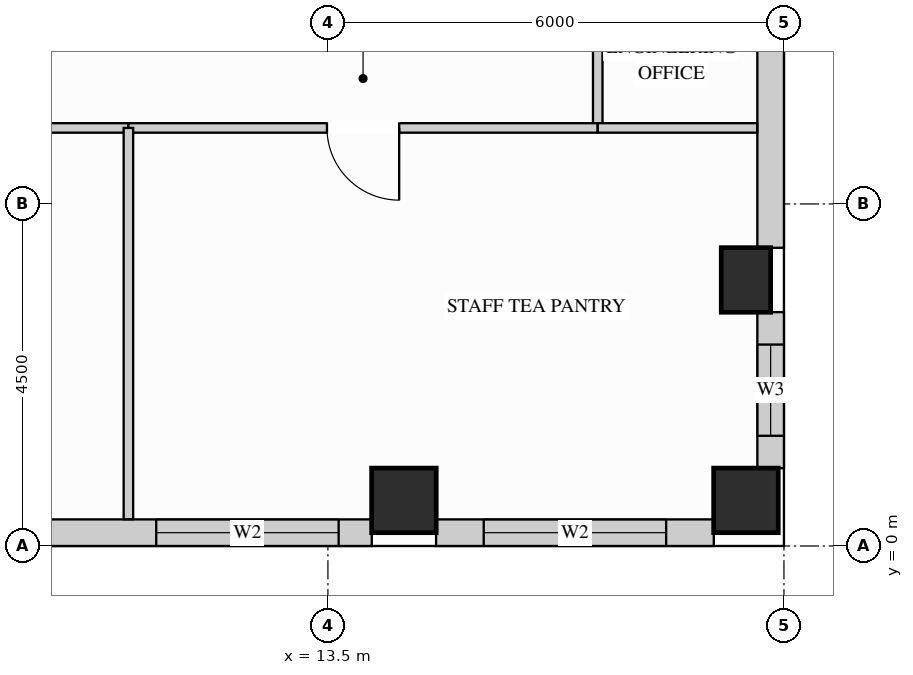
"""IFC4 building model, lengths in metres.
Left out: names, types, materials, properties, quantities, classifications, styles, units other than length and angle.
Written with IfcOpenShell. Run it as: python <this file> out.ifc"""

import sys

from ifc_helpers import new_model, si_unit, direction, frame, frame_2d, origin, origin_2d, place, context, subcontext, project, spatial, rectangle, extrude, source, transform, mapped, element, fill, save


model = new_model("IFC4")
c1 = context("Model", 3, precision=1e-05, world=origin(), true_north=direction((0.0, 1.0)))
c2 = subcontext(c1, "Body", "Model", "MODEL_VIEW")
j1 = project(units=[si_unit("LENGTHUNIT", "METRE"), si_unit("PLANEANGLEUNIT", "RADIAN")], contexts=[c1])
p1 = place(None, origin())
s1 = spatial("IfcSite", under=j1, at=p1, CompositionType="ELEMENT")
p2 = place(p1, origin())
s2 = spatial("IfcBuilding", under=s1, at=p2, CompositionType="ELEMENT")
p3 = place(p2, frame((0.0, 0.0, 237.6)))
s3 = spatial("IfcBuildingStorey", under=s2, at=p3, CompositionType="ELEMENT", Elevation=237.6)
m1 = source(origin(), c2, "Body", "SweptSolid", [
    extrude(rectangle(XDim=0.65, YDim=0.85, at=origin_2d()), origin(), (0.0, 0.0, 1.0), 3.4),
])
p4 = place(p3, frame((19.0, 3.5, 0.0), z_axis=(0.0, 0.0, 1.0), x_axis=(1.0, 0.0, 0.0)))
e1 = element("IfcColumn", 1, at=p4, inside=s3, PredefinedType="COLUMN", context=c2, shape_type="MappedRepresentation", body=[
    mapped(m1, transform((0.0, 0.0, 0.0), x_axis=(1.0, 0.0, 0.0), y_axis=(0.0, 1.0, 0.0), z_axis=(0.0, 0.0, 1.0))),
])
m2 = source(origin(), c2, "Body", "SweptSolid", [
    extrude(rectangle(XDim=0.85, YDim=0.85, at=origin_2d()), origin(), (0.0, 0.0, 1.0), 3.4),
])
for number, where, z_axis, x_axis in (
    (2, (14.5, 0.6, 0.0), (0.0, 0.0, 1.0), (1.0, 0.0, 0.0)),
    (3, (19.0, 0.6, 0.0), (0.0, 0.0, 1.0), (1.0, 0.0, 0.0)),
):
    element("IfcColumn", number, at=place(p3, frame(where, z_axis=z_axis, x_axis=x_axis)), inside=s3, PredefinedType="COLUMN", context=c2, shape_type="MappedRepresentation", body=[
        mapped(m2, transform((0.0, 0.0, 0.0), x_axis=(1.0, 0.0, 0.0), y_axis=(0.0, 1.0, 0.0), z_axis=(0.0, 0.0, 1.0))),
    ])
p5 = place(p3, frame((9.423, 0.175, 0.0), z_axis=(0.0, 0.0, 1.0), x_axis=(1.0, 0.0, 0.0)))
e4 = element("IfcWall", 4, at=p5, inside=s3, PredefinedType="SOLIDWALL", context=c2, shape_type="SweptSolid", body=[
    extrude(rectangle(XDim=4.654, YDim=0.35, at=frame_2d((2.327, 0.0))), origin(), (0.0, 0.0, 1.0), 3.385),
])
p6 = place(p5, frame((1.818, 0.0, 0.78)))
e5 = element("IfcOpeningElement", 5, at=p6, cuts=e4, PredefinedType="OPENING", context=c2, shape_type="SweptSolid", body=[
    extrude(rectangle(XDim=2.4, YDim=2.1, at=frame_2d((1.2, 1.05))), frame((0.0, 0.185, 0.0), z_axis=(0.0, -1.0, 0.0), x_axis=(1.0, 0.0, 0.0)), (0.0, 0.0, 1.0), 0.37),
])
p7 = place(p3, frame((14.923, 0.175, 0.0), z_axis=(0.0, 0.0, 1.0), x_axis=(1.0, 0.0, 0.0)))
e6 = element("IfcWall", 6, at=p7, inside=s3, PredefinedType="SOLIDWALL", context=c2, shape_type="SweptSolid", body=[
    extrude(rectangle(XDim=3.654, YDim=0.35, at=frame_2d((1.827, 0.0))), origin(), (0.0, 0.0, 1.0), 3.385),
])
p8 = place(p7, frame((0.627, 0.0, 0.78)))
e7 = element("IfcOpeningElement", 7, at=p8, cuts=e6, PredefinedType="OPENING", context=c2, shape_type="SweptSolid", body=[
    extrude(rectangle(XDim=2.4, YDim=2.1, at=frame_2d((1.2, 1.05))), frame((0.0, 0.185, 0.0), z_axis=(0.0, -1.0, 0.0), x_axis=(1.0, 0.0, 0.0)), (0.0, 0.0, 1.0), 0.37),
])
p9 = place(p3, frame((19.325, 1.023, 0.0), z_axis=(0.0, 0.0, 1.0), x_axis=(0.0, 1.0, 0.0)))
e8 = element("IfcWall", 8, at=p9, inside=s3, PredefinedType="SOLIDWALL", context=c2, shape_type="SweptSolid", body=[
    extrude(rectangle(XDim=2.054, YDim=0.35, at=frame_2d((1.027, 0.0))), origin(), (0.0, 0.0, 1.0), 2.619),
])
p10 = place(p9, frame((0.427, 0.0, 0.78)))
e9 = element("IfcOpeningElement", 9, at=p10, cuts=e8, PredefinedType="OPENING", context=c2, shape_type="SweptSolid", body=[
    extrude(rectangle(XDim=1.2, YDim=1.659, at=frame_2d((0.6, 0.83))), frame((0.0, 0.185, 0.0), z_axis=(0.0, -1.0, 0.0), x_axis=(1.0, 0.0, 0.0)), (0.0, 0.0, 1.0), 0.37),
])
m3 = source(origin(), c2, "Body", "SweptSolid", [
    extrude(rectangle(XDim=4.154, YDim=0.35, at=frame_2d((2.077, 0.0))), origin(), (0.0, 0.0, 1.0), 2.619),
])
p11 = place(p3, frame((19.325, 3.923, 0.0), z_axis=(0.0, 0.0, 1.0), x_axis=(0.0, 1.0, 0.0)))
e10 = element("IfcWall", 10, at=p11, inside=s3, PredefinedType="SOLIDWALL", context=c2, shape_type="MappedRepresentation", body=[
    mapped(m3, transform((0.0, 0.0, 0.0), x_axis=(1.0, 0.0, 0.0), y_axis=(0.0, 1.0, 0.0), z_axis=(0.0, 0.0, 1.0))),
])
p12 = place(p3, frame((17.05, 5.5, 0.0), z_axis=(0.0, 0.0, 1.0), x_axis=(0.0, 1.0, 0.0)))
e11 = element("IfcWall", 11, at=p12, inside=s3, PredefinedType="PARTITIONING", context=c2, shape_type="SweptSolid", body=[
    extrude(rectangle(XDim=5.1, YDim=0.125, at=frame_2d((2.55, 0.0))), origin(), (0.0, 0.0, 1.0), 3.385),
])
p13 = place(p12, frame((2.075, 0.0, 0.0)))
e12 = element("IfcOpeningElement", 12, at=p13, cuts=e11, PredefinedType="OPENING", context=c2, shape_type="SweptSolid", body=[
    extrude(rectangle(XDim=0.95, YDim=2.15, at=frame_2d((0.475, 1.075))), frame((0.0, 0.073, 0.0), z_axis=(0.0, -1.0, 0.0), x_axis=(1.0, 0.0, 0.0)), (0.0, 0.0, 1.0), 0.145),
])
p14 = place(p3, frame((2.45, 5.5, 0.0), z_axis=(0.0, 0.0, 1.0), x_axis=(1.0, 0.0, 0.0)))
e13 = element("IfcWall", 13, at=p14, inside=s3, PredefinedType="PARTITIONING", context=c2, shape_type="SweptSolid", body=[
    extrude(rectangle(XDim=8.425, YDim=0.125, at=frame_2d((4.212, 0.0))), origin(), (0.0, 0.0, 1.0), 3.385),
])
p15 = place(p14, frame((3.738, 0.0, 0.0)))
e14 = element("IfcOpeningElement", 14, at=p15, cuts=e13, PredefinedType="OPENING", context=c2, shape_type="SweptSolid", body=[
    extrude(rectangle(XDim=0.95, YDim=2.15, at=frame_2d((0.475, 1.075))), frame((0.0, 0.073, 0.0), z_axis=(0.0, -1.0, 0.0), x_axis=(1.0, 0.0, 0.0)), (0.0, 0.0, 1.0), 0.145),
])
p16 = place(p3, frame((10.875, 5.5, 0.0), z_axis=(0.0, 0.0, 1.0), x_axis=(1.0, 0.0, 0.0)))
e15 = element("IfcWall", 15, at=p16, inside=s3, PredefinedType="PARTITIONING", context=c2, shape_type="SweptSolid", body=[
    extrude(rectangle(XDim=6.175, YDim=0.125, at=frame_2d((3.087, 0.0))), origin(), (0.0, 0.0, 1.0), 3.385),
])
p17 = place(p16, frame((2.613, 0.0, 0.0)))
e16 = element("IfcOpeningElement", 16, at=p17, cuts=e15, PredefinedType="OPENING", context=c2, shape_type="SweptSolid", body=[
    extrude(rectangle(XDim=0.95, YDim=2.15, at=frame_2d((0.475, 1.075))), frame((0.0, 0.073, 0.0), z_axis=(0.0, -1.0, 0.0), x_axis=(1.0, 0.0, 0.0)), (0.0, 0.0, 1.0), 0.145),
])
m4 = source(origin(), c2, "Body", "SweptSolid", [
    extrude(rectangle(XDim=2.098, YDim=0.125, at=frame_2d((1.049, 0.0))), origin(), (0.0, 0.0, 1.0), 3.385),
])
p18 = place(p3, frame((17.05, 5.5, 0.0), z_axis=(0.0, 0.0, 1.0), x_axis=(1.0, 0.0, 0.0)))
e17 = element("IfcWall", 17, at=p18, inside=s3, PredefinedType="PARTITIONING", context=c2, shape_type="MappedRepresentation", body=[
    mapped(m4, transform((0.0, 0.0, 0.0), x_axis=(1.0, 0.0, 0.0), y_axis=(0.0, 1.0, 0.0), z_axis=(0.0, 0.0, 1.0))),
])
m5 = source(origin(), c2, "Body", "SweptSolid", [
    extrude(rectangle(XDim=5.148, YDim=0.125, at=frame_2d((2.574, 0.0))), origin(), (0.0, 0.0, 1.0), 3.385),
])
p19 = place(p3, frame((10.875, 0.352, 0.0), z_axis=(0.0, 0.0, 1.0), x_axis=(0.0, 1.0, 0.0)))
e18 = element("IfcWall", 18, at=p19, inside=s3, PredefinedType="PARTITIONING", context=c2, shape_type="MappedRepresentation", body=[
    mapped(m5, transform((0.0, 0.0, 0.0), x_axis=(1.0, 0.0, 0.0), y_axis=(0.0, 1.0, 0.0), z_axis=(0.0, 0.0, 1.0))),
])
m6 = source(origin(), c2, "Body", "SweptSolid", [
    extrude(rectangle(XDim=0.95, YDim=2.15, at=frame_2d((0.475, 1.075))), frame((0.0, 0.025, 0.0), z_axis=(0.0, -1.0, 0.0), x_axis=(1.0, 0.0, 0.0)), (0.0, 0.0, 1.0), 0.05),
])
p20 = place(p17, origin())
e19 = element("IfcDoor", 19, at=p20, inside=s3, OperationType="SINGLE_SWING_RIGHT", PredefinedType="DOOR", context=c2, shape_type="MappedRepresentation", body=[
    mapped(m6, transform((0.0, 0.0, 0.0), x_axis=(1.0, 0.0, 0.0), y_axis=(0.0, 1.0, 0.0), z_axis=(0.0, 0.0, 1.0))),
])
fill(e16, e19)
m7 = source(origin(), c2, "Body", "SweptSolid", [
    extrude(rectangle(XDim=2.4, YDim=2.1, at=frame_2d((1.2, 1.05))), frame((0.0, 0.03, 0.0), z_axis=(0.0, -1.0, 0.0), x_axis=(1.0, 0.0, 0.0)), (0.0, 0.0, 1.0), 0.06),
])
p21 = place(p6, origin())
e20 = element("IfcWindow", 20, at=p21, inside=s3, PartitioningType="SINGLE_PANEL", PredefinedType="WINDOW", context=c2, shape_type="MappedRepresentation", body=[
    mapped(m7, transform((0.0, 0.0, 0.0), x_axis=(1.0, 0.0, 0.0), y_axis=(0.0, 1.0, 0.0), z_axis=(0.0, 0.0, 1.0))),
])
fill(e5, e20)
p22 = place(p8, origin())
e21 = element("IfcWindow", 21, at=p22, inside=s3, PartitioningType="SINGLE_PANEL", PredefinedType="WINDOW", context=c2, shape_type="MappedRepresentation", body=[
    mapped(m7, transform((0.0, 0.0, 0.0), x_axis=(1.0, 0.0, 0.0), y_axis=(0.0, 1.0, 0.0), z_axis=(0.0, 0.0, 1.0))),
])
fill(e7, e21)
m8 = source(origin(), c2, "Body", "SweptSolid", [
    extrude(rectangle(XDim=1.2, YDim=1.659, at=frame_2d((0.6, 0.83))), frame((0.0, 0.03, 0.0), z_axis=(0.0, -1.0, 0.0), x_axis=(1.0, 0.0, 0.0)), (0.0, 0.0, 1.0), 0.06),
])
p23 = place(p10, origin())
e22 = element("IfcWindow", 22, at=p23, inside=s3, PartitioningType="SINGLE_PANEL", PredefinedType="WINDOW", context=c2, shape_type="MappedRepresentation", body=[
    mapped(m8, transform((0.0, 0.0, 0.0), x_axis=(1.0, 0.0, 0.0), y_axis=(0.0, 1.0, 0.0), z_axis=(0.0, 0.0, 1.0))),
])
fill(e9, e22)
save(model, sys.argv[1])
